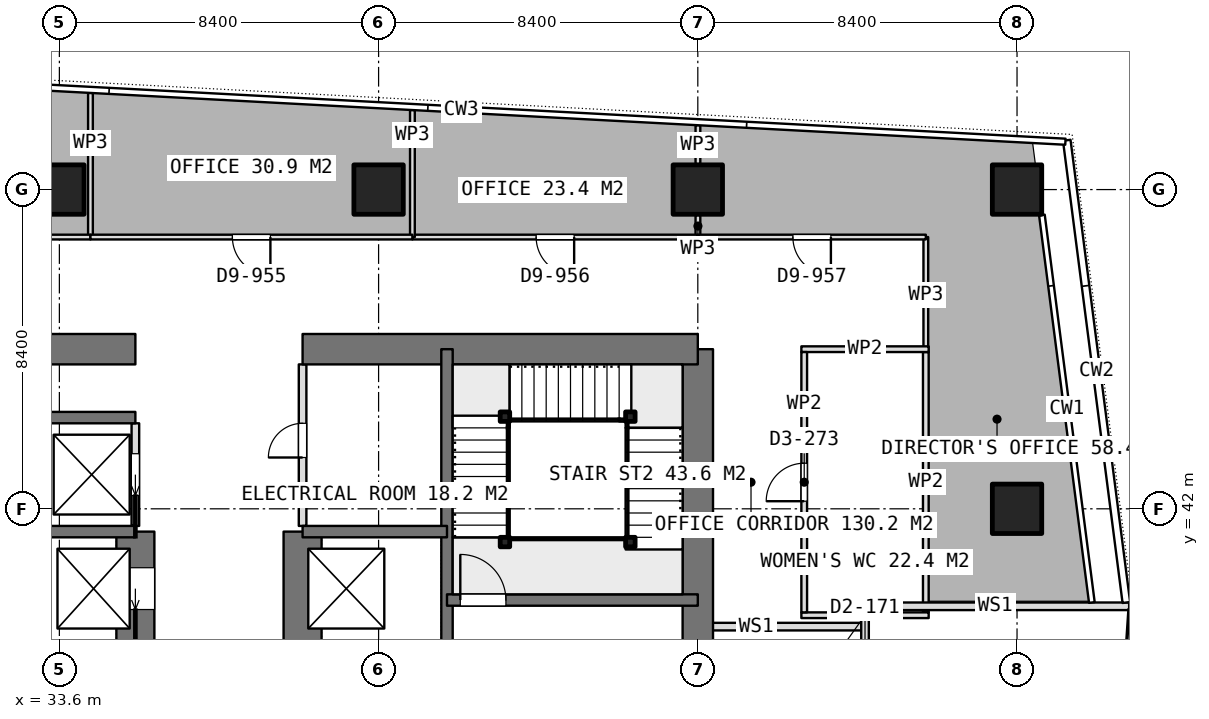
"""IFC4 building model, lengths in metres.
Left out: names, types, materials, properties, quantities, classifications, styles, units other than length and angle.
Written with IfcOpenShell. Run it as: python <this file> out.ifc"""

import sys

from ifc_helpers import new_model, si_unit, direction, frame, frame_2d, origin, origin_2d, place, context, subcontext, project, spatial, rectangle, extrude, element, fill, save


model = new_model("IFC4")
c1 = context("Model", 3, precision=1e-05, world=origin(), true_north=direction((0.0, 1.0)))
c2 = subcontext(c1, "Body", "Model", "MODEL_VIEW")
j1 = project(units=[si_unit("LENGTHUNIT", "METRE"), si_unit("PLANEANGLEUNIT", "RADIAN")], contexts=[c1])
p1 = place(None, origin())
s1 = spatial("IfcSite", under=j1, at=p1, CompositionType="ELEMENT")
p2 = place(p1, origin())
s2 = spatial("IfcBuilding", under=s1, at=p2, CompositionType="ELEMENT")
p3 = place(p2, frame((0.0, 0.0, 253.85)))
s3 = spatial("IfcBuildingStorey", under=s2, at=p3, CompositionType="ELEMENT", Elevation=253.85)
p4 = place(p3, frame((25.2, 46.2, 0.0), z_axis=(0.0, 0.0, 1.0), x_axis=(1.0, 0.0, 0.0)))
e1 = element("IfcWall", 1, at=p4, inside=s3, PredefinedType="SHEAR", context=c2, shape_type="SweptSolid", body=[
    extrude(rectangle(XDim=10.4, YDim=0.8, at=frame_2d((5.2, 0.0))), origin(), (0.0, 0.0, 1.0), 3.75),
])
p5 = place(p3, frame((40.0, 46.2, 0.0), z_axis=(0.0, 0.0, 1.0), x_axis=(1.0, 0.0, 0.0)))
e2 = element("IfcWall", 2, at=p5, inside=s3, PredefinedType="SHEAR", context=c2, shape_type="SweptSolid", body=[
    extrude(rectangle(XDim=10.4, YDim=0.8, at=frame_2d((5.2, 0.0))), origin(), (0.0, 0.0, 1.0), 3.75),
])
p6 = place(p3, frame((50.4, 21.0, 0.0), z_axis=(0.0, 0.0, 1.0), x_axis=(0.0, 1.0, 0.0)))
e3 = element("IfcWall", 3, at=p6, inside=s3, PredefinedType="SHEAR", context=c2, shape_type="SweptSolid", body=[
    extrude(rectangle(XDim=25.2, YDim=0.8, at=frame_2d((12.6, 0.0))), origin(), (0.0, 0.0, 1.0), 3.75),
])
p7 = place(p6, frame((16.2, 0.0, 0.0)))
e4 = element("IfcOpeningElement", 4, at=p7, cuts=e3, PredefinedType="OPENING", context=c2, shape_type="SweptSolid", body=[
    extrude(rectangle(XDim=1.2, YDim=2.1, at=frame_2d((0.6, 1.05))), frame((0.0, 0.41, 0.0), z_axis=(0.0, -1.0, 0.0), x_axis=(1.0, 0.0, 0.0)), (0.0, 0.0, 1.0), 0.82),
])
p8 = place(p6, frame((10.05, 0.0, 0.0)))
e5 = element("IfcOpeningElement", 5, at=p8, cuts=e3, PredefinedType="OPENING", context=c2, shape_type="SweptSolid", body=[
    extrude(rectangle(XDim=0.9, YDim=2.1, at=frame_2d((0.45, 1.05))), frame((0.0, 0.41, 0.0), z_axis=(0.0, -1.0, 0.0), x_axis=(1.0, 0.0, 0.0)), (0.0, 0.0, 1.0), 0.82),
])
p9 = place(p6, frame((7.45, 0.0, 0.0)))
e6 = element("IfcOpeningElement", 6, at=p9, cuts=e3, PredefinedType="OPENING", context=c2, shape_type="SweptSolid", body=[
    extrude(rectangle(XDim=0.9, YDim=2.1, at=frame_2d((0.45, 1.05))), frame((0.0, 0.41, 0.0), z_axis=(0.0, -1.0, 0.0), x_axis=(1.0, 0.0, 0.0)), (0.0, 0.0, 1.0), 0.82),
])
p10 = place(p6, frame((0.6, 0.0, 0.0)))
e7 = element("IfcOpeningElement", 7, at=p10, cuts=e3, PredefinedType="OPENING", context=c2, shape_type="SweptSolid", body=[
    extrude(rectangle(XDim=1.2, YDim=2.1, at=frame_2d((0.6, 1.05))), frame((0.0, 0.41, 0.0), z_axis=(0.0, -1.0, 0.0), x_axis=(1.0, 0.0, 0.0)), (0.0, 0.0, 1.0), 0.82),
])
p11 = place(p3, frame((43.8, 21.0, 0.0), z_axis=(0.0, 0.0, 1.0), x_axis=(0.0, 1.0, 0.0)))
e8 = element("IfcWall", 8, at=p11, inside=s3, PredefinedType="SHEAR", context=c2, shape_type="SweptSolid", body=[
    extrude(rectangle(XDim=25.2, YDim=0.3, at=frame_2d((12.6, 0.0))), origin(), (0.0, 0.0, 1.0), 3.75),
])
p12 = place(p3, frame((35.6, 23.4, 0.0), z_axis=(0.0, 0.0, 1.0), x_axis=(0.0, 1.0, 0.0)))
e9 = element("IfcWall", 9, at=p12, inside=s3, PredefinedType="SHEAR", context=c2, shape_type="SweptSolid", body=[
    extrude(rectangle(XDim=18.0, YDim=1.0, at=frame_2d((9.0, 0.0))), origin(), (0.0, 0.0, 1.0), 3.75),
])
p13 = place(p12, frame((0.95, 0.0, 0.0)))
e10 = element("IfcOpeningElement", 10, at=p13, cuts=e9, PredefinedType="OPENING", context=c2, shape_type="SweptSolid", body=[
    extrude(rectangle(XDim=1.1, YDim=2.1, at=frame_2d((0.55, 1.05))), frame((0.0, 0.51, 0.0), z_axis=(0.0, -1.0, 0.0), x_axis=(1.0, 0.0, 0.0)), (0.0, 0.0, 1.0), 1.02),
])
p14 = place(p12, frame((3.95, 0.0, 0.0)))
e11 = element("IfcOpeningElement", 11, at=p14, cuts=e9, PredefinedType="OPENING", context=c2, shape_type="SweptSolid", body=[
    extrude(rectangle(XDim=1.1, YDim=2.1, at=frame_2d((0.55, 1.05))), frame((0.0, 0.51, 0.0), z_axis=(0.0, -1.0, 0.0), x_axis=(1.0, 0.0, 0.0)), (0.0, 0.0, 1.0), 1.02),
])
p15 = place(p12, frame((6.95, 0.0, 0.0)))
e12 = element("IfcOpeningElement", 12, at=p15, cuts=e9, PredefinedType="OPENING", context=c2, shape_type="SweptSolid", body=[
    extrude(rectangle(XDim=1.1, YDim=2.1, at=frame_2d((0.55, 1.05))), frame((0.0, 0.51, 0.0), z_axis=(0.0, -1.0, 0.0), x_axis=(1.0, 0.0, 0.0)), (0.0, 0.0, 1.0), 1.02),
])
p16 = place(p12, frame((9.95, 0.0, 0.0)))
e13 = element("IfcOpeningElement", 13, at=p16, cuts=e9, PredefinedType="OPENING", context=c2, shape_type="SweptSolid", body=[
    extrude(rectangle(XDim=1.1, YDim=2.1, at=frame_2d((0.55, 1.05))), frame((0.0, 0.51, 0.0), z_axis=(0.0, -1.0, 0.0), x_axis=(1.0, 0.0, 0.0)), (0.0, 0.0, 1.0), 1.02),
])
p17 = place(p12, frame((12.95, 0.0, 0.0)))
e14 = element("IfcOpeningElement", 14, at=p17, cuts=e9, PredefinedType="OPENING", context=c2, shape_type="SweptSolid", body=[
    extrude(rectangle(XDim=1.1, YDim=2.1, at=frame_2d((0.55, 1.05))), frame((0.0, 0.51, 0.0), z_axis=(0.0, -1.0, 0.0), x_axis=(1.0, 0.0, 0.0)), (0.0, 0.0, 1.0), 1.02),
])
p18 = place(p12, frame((15.95, 0.0, 0.0)))
e15 = element("IfcOpeningElement", 15, at=p18, cuts=e9, PredefinedType="OPENING", context=c2, shape_type="SweptSolid", body=[
    extrude(rectangle(XDim=1.1, YDim=2.1, at=frame_2d((0.55, 1.05))), frame((0.0, 0.51, 0.0), z_axis=(0.0, -1.0, 0.0), x_axis=(1.0, 0.0, 0.0)), (0.0, 0.0, 1.0), 1.02),
])
p19 = place(p3, frame((40.0, 23.4, 0.0), z_axis=(0.0, 0.0, 1.0), x_axis=(0.0, 1.0, 0.0)))
e16 = element("IfcWall", 16, at=p19, inside=s3, PredefinedType="SHEAR", context=c2, shape_type="SweptSolid", body=[
    extrude(rectangle(XDim=18.0, YDim=1.0, at=frame_2d((9.0, 0.0))), origin(), (0.0, 0.0, 1.0), 3.75),
])
p20 = place(p19, frame((3.15, 0.0, 0.0)))
e17 = element("IfcOpeningElement", 17, at=p20, cuts=e16, PredefinedType="OPENING", context=c2, shape_type="SweptSolid", body=[
    extrude(rectangle(XDim=0.9, YDim=2.1, at=frame_2d((0.45, 1.05))), frame((0.0, 0.51, 0.0), z_axis=(0.0, -1.0, 0.0), x_axis=(1.0, 0.0, 0.0)), (0.0, 0.0, 1.0), 1.02),
])
p21 = place(p19, frame((9.15, 0.0, 0.0)))
e18 = element("IfcOpeningElement", 18, at=p21, cuts=e16, PredefinedType="OPENING", context=c2, shape_type="SweptSolid", body=[
    extrude(rectangle(XDim=0.9, YDim=2.1, at=frame_2d((0.45, 1.05))), frame((0.0, 0.51, 0.0), z_axis=(0.0, -1.0, 0.0), x_axis=(1.0, 0.0, 0.0)), (0.0, 0.0, 1.0), 1.02),
])
for number, where, z_axis, x_axis in (
    (19, (31.8, 41.4, 0.0), (0.0, 0.0, 1.0), (1.0, 0.0, 0.0)),
    (20, (31.8, 44.4, 0.0), (0.0, 0.0, 1.0), (1.0, 0.0, 0.0)),
    (21, (40.0, 41.4, 0.0), (0.0, 0.0, 1.0), (1.0, 0.0, 0.0)),
):
    element("IfcWall", number, at=place(p3, frame(where, z_axis=z_axis, x_axis=x_axis)), inside=s3, PredefinedType="SHEAR", context=c2, shape_type="SweptSolid", body=[
        extrude(rectangle(XDim=3.8, YDim=0.3, at=frame_2d((1.9, 0.0))), origin(), (0.0, 0.0, 1.0), 3.75),
    ])
p22 = place(p3, frame((43.8, 39.6, 0.0), z_axis=(0.0, 0.0, 1.0), x_axis=(1.0, 0.0, 0.0)))
e22 = element("IfcWall", 22, at=p22, inside=s3, PredefinedType="SHEAR", context=c2, shape_type="SweptSolid", body=[
    extrude(rectangle(XDim=6.6, YDim=0.3, at=frame_2d((3.3, 0.0))), origin(), (0.0, 0.0, 1.0), 3.75),
])
p23 = place(p22, frame((0.35, 0.0, 0.0)))
e23 = element("IfcOpeningElement", 23, at=p23, cuts=e22, PredefinedType="OPENING", context=c2, shape_type="SweptSolid", body=[
    extrude(rectangle(XDim=1.2, YDim=2.1, at=frame_2d((0.6, 1.05))), frame((0.0, 0.16, 0.0), z_axis=(0.0, -1.0, 0.0), x_axis=(1.0, 0.0, 0.0)), (0.0, 0.0, 1.0), 0.32),
])
for number, where, z_axis, x_axis in (
    (24, (33.6, 50.4, 0.0), (0.0, 0.0, 1.0), (1.0, 0.0, 0.0)),
    (25, (42.0, 50.4, 0.0), (0.0, 0.0, 1.0), (1.0, 0.0, 0.0)),
    (26, (50.4, 50.4, 0.0), (0.0, 0.0, 1.0), (1.0, 0.0, 0.0)),
    (27, (58.8, 42.0, 0.0), (0.0, 0.0, 1.0), (1.0, 0.0, 0.0)),
    (28, (58.8, 50.4, 0.0), (0.0, 0.0, 1.0), (1.0, 0.0, 0.0)),
):
    element("IfcColumn", number, at=place(p3, frame(where, z_axis=z_axis, x_axis=x_axis)), inside=s3, PredefinedType="COLUMN", context=c2, shape_type="SweptSolid", body=[
        extrude(rectangle(XDim=1.3, YDim=1.3, at=origin_2d()), origin(), (0.0, 0.0, 1.0), 3.75),
    ])
p24 = place(p3, frame((40.0, 41.55, 0.0), z_axis=(0.0, 0.0, 1.0), x_axis=(0.0, 1.0, 0.0)))
e29 = element("IfcWall", 29, at=p24, inside=s3, PredefinedType="PARTITIONING", context=c2, shape_type="SweptSolid", body=[
    extrude(rectangle(XDim=4.25, YDim=0.2, at=frame_2d((2.125, 0.0))), origin(), (0.0, 0.0, 1.0), 3.5),
])
p25 = place(p24, frame((1.8, 0.0, 0.0)))
e30 = element("IfcOpeningElement", 30, at=p25, cuts=e29, PredefinedType="OPENING", context=c2, shape_type="SweptSolid", body=[
    extrude(rectangle(XDim=0.9, YDim=2.1, at=frame_2d((0.45, 1.05))), frame((0.0, 0.11, 0.0), z_axis=(0.0, -1.0, 0.0), x_axis=(1.0, 0.0, 0.0)), (0.0, 0.0, 1.0), 0.22),
])
p26 = place(p3, frame((35.6, 41.55, 0.0), z_axis=(0.0, 0.0, 1.0), x_axis=(0.0, 1.0, 0.0)))
e31 = element("IfcWall", 31, at=p26, inside=s3, PredefinedType="PARTITIONING", context=c2, shape_type="SweptSolid", body=[
    extrude(rectangle(XDim=2.7, YDim=0.2, at=frame_2d((1.35, 0.0))), origin(), (0.0, 0.0, 1.0), 3.5),
])
p27 = place(p26, frame((0.8, 0.0, 0.0)))
e32 = element("IfcOpeningElement", 32, at=p27, cuts=e31, PredefinedType="OPENING", context=c2, shape_type="SweptSolid", body=[
    extrude(rectangle(XDim=1.1, YDim=2.1, at=frame_2d((0.55, 1.05))), frame((0.0, 0.11, 0.0), z_axis=(0.0, -1.0, 0.0), x_axis=(1.0, 0.0, 0.0)), (0.0, 0.0, 1.0), 0.22),
])
for number, where, z_axis, x_axis in (
    (33, (53.125, 39.2, 0.0), (0.0, 0.0, 1.0), (1.0, 0.0, 0.0)),
    (34, (53.125, 46.2, 0.0), (0.0, 0.0, 1.0), (1.0, 0.0, 0.0)),
):
    element("IfcWall", number, at=place(p3, frame(where, z_axis=z_axis, x_axis=x_axis)), inside=s3, PredefinedType="PARTITIONING", context=c2, shape_type="SweptSolid", body=[
        extrude(rectangle(XDim=3.35, YDim=0.15, at=frame_2d((1.675, 0.0))), origin(), (0.0, 0.0, 1.0), 3.5),
    ])
p28 = place(p3, frame((53.2, 39.275, 0.0), z_axis=(0.0, 0.0, 1.0), x_axis=(0.0, 1.0, 0.0)))
e35 = element("IfcWall", 35, at=p28, inside=s3, PredefinedType="PARTITIONING", context=c2, shape_type="SweptSolid", body=[
    extrude(rectangle(XDim=6.85, YDim=0.15, at=frame_2d((3.425, 0.0))), origin(), (0.0, 0.0, 1.0), 3.5),
])
p29 = place(p28, frame((2.925, 0.0, 0.0)))
e36 = element("IfcOpeningElement", 36, at=p29, cuts=e35, PredefinedType="OPENING", context=c2, shape_type="SweptSolid", body=[
    extrude(rectangle(XDim=1.0, YDim=2.1, at=frame_2d((0.5, 1.05))), frame((0.0, 0.085, 0.0), z_axis=(0.0, -1.0, 0.0), x_axis=(1.0, 0.0, 0.0)), (0.0, 0.0, 1.0), 0.17),
])
p30 = place(p3, frame((56.4, 39.275, 0.0), z_axis=(0.0, 0.0, 1.0), x_axis=(0.0, 1.0, 0.0)))
e37 = element("IfcWall", 37, at=p30, inside=s3, PredefinedType="PARTITIONING", context=c2, shape_type="SweptSolid", body=[
    extrude(rectangle(XDim=6.85, YDim=0.15, at=frame_2d((3.425, 0.0))), origin(), (0.0, 0.0, 1.0), 3.5),
])
p31 = place(p3, frame((50.403, 49.15, 0.0), z_axis=(0.0, 0.0, 1.0), x_axis=(0.0, 1.0, 0.0)))
e38 = element("IfcWall", 38, at=p31, inside=s3, PredefinedType="PARTITIONING", context=c2, shape_type="SweptSolid", body=[
    extrude(rectangle(XDim=0.58, YDim=0.125, at=frame_2d((0.29, 0.0))), origin(), (0.0, 0.0, 1.0), 3.5),
])
p32 = place(p3, frame((50.403, 51.07, 0.0), z_axis=(0.0, 0.0, 1.0), x_axis=(0.0, 1.0, 0.0)))
e39 = element("IfcWall", 39, at=p32, inside=s3, PredefinedType="PARTITIONING", context=c2, shape_type="SweptSolid", body=[
    extrude(rectangle(XDim=1.024, YDim=0.125, at=frame_2d((0.512, 0.0))), origin(), (0.0, 0.0, 1.0), 3.5),
])
p33 = place(p3, frame((56.4, 46.125, 0.0), z_axis=(0.0, 0.0, 1.0), x_axis=(0.0, 1.0, 0.0)))
e40 = element("IfcWall", 40, at=p33, inside=s3, PredefinedType="PARTITIONING", context=c2, shape_type="SweptSolid", body=[
    extrude(rectangle(XDim=3.025, YDim=0.125, at=frame_2d((1.512, 0.0))), origin(), (0.0, 0.0, 1.0), 3.5),
])
p34 = place(p3, frame((56.4, 49.15, 0.0), z_axis=(0.0, 0.0, 1.0), x_axis=(-1.0, 0.0, 0.0)))
e41 = element("IfcWall", 41, at=p34, inside=s3, PredefinedType="PARTITIONING", context=c2, shape_type="SweptSolid", body=[
    extrude(rectangle(XDim=5.997, YDim=0.125, at=frame_2d((2.999, 0.0))), origin(), (0.0, 0.0, 1.0), 3.5),
])
p35 = place(p34, frame((2.498, 0.0, 0.0)))
e42 = element("IfcOpeningElement", 42, at=p35, cuts=e41, PredefinedType="OPENING", context=c2, shape_type="SweptSolid", body=[
    extrude(rectangle(XDim=1.0, YDim=2.1, at=frame_2d((0.5, 1.05))), frame((0.0, 0.073, 0.0), z_axis=(0.0, -1.0, 0.0), x_axis=(1.0, 0.0, 0.0)), (0.0, 0.0, 1.0), 0.145),
])
p36 = place(p3, frame((50.402, 49.15, 0.0), z_axis=(0.0, 0.0, 1.0), x_axis=(-1.0, 0.0, 0.0)))
e43 = element("IfcWall", 43, at=p36, inside=s3, PredefinedType="PARTITIONING", context=c2, shape_type="SweptSolid", body=[
    extrude(rectangle(XDim=7.512, YDim=0.125, at=frame_2d((3.756, 0.0))), origin(), (0.0, 0.0, 1.0), 3.5),
])
p37 = place(p36, frame((3.256, 0.0, 0.0)))
e44 = element("IfcOpeningElement", 44, at=p37, cuts=e43, PredefinedType="OPENING", context=c2, shape_type="SweptSolid", body=[
    extrude(rectangle(XDim=1.0, YDim=2.1, at=frame_2d((0.5, 1.05))), frame((0.0, 0.073, 0.0), z_axis=(0.0, -1.0, 0.0), x_axis=(1.0, 0.0, 0.0)), (0.0, 0.0, 1.0), 0.145),
])
p38 = place(p3, frame((42.89, 49.15, 0.0), z_axis=(0.0, 0.0, 1.0), x_axis=(0.0, 1.0, 0.0)))
e45 = element("IfcWall", 45, at=p38, inside=s3, PredefinedType="PARTITIONING", context=c2, shape_type="SweptSolid", body=[
    extrude(rectangle(XDim=3.343, YDim=0.125, at=frame_2d((1.671, 0.0))), origin(), (0.0, 0.0, 1.0), 3.5),
])
p39 = place(p3, frame((42.889, 49.15, 0.0), z_axis=(0.0, 0.0, 1.0), x_axis=(-1.0, 0.0, 0.0)))
e46 = element("IfcWall", 46, at=p39, inside=s3, PredefinedType="PARTITIONING", context=c2, shape_type="SweptSolid", body=[
    extrude(rectangle(XDim=8.471, YDim=0.125, at=frame_2d((4.235, 0.0))), origin(), (0.0, 0.0, 1.0), 3.5),
])
p40 = place(p39, frame((3.736, 0.0, 0.0)))
e47 = element("IfcOpeningElement", 47, at=p40, cuts=e46, PredefinedType="OPENING", context=c2, shape_type="SweptSolid", body=[
    extrude(rectangle(XDim=1.0, YDim=2.1, at=frame_2d((0.5, 1.05))), frame((0.0, 0.073, 0.0), z_axis=(0.0, -1.0, 0.0), x_axis=(1.0, 0.0, 0.0)), (0.0, 0.0, 1.0), 0.145),
])
p41 = place(p3, frame((34.418, 49.15, 0.0), z_axis=(0.0, 0.0, 1.0), x_axis=(0.0, 1.0, 0.0)))
e48 = element("IfcWall", 48, at=p41, inside=s3, PredefinedType="PARTITIONING", context=c2, shape_type="SweptSolid", body=[
    extrude(rectangle(XDim=3.793, YDim=0.125, at=frame_2d((1.896, 0.0))), origin(), (0.0, 0.0, 1.0), 3.5),
])
p42 = place(p3, frame((34.417, 49.15, 0.0), z_axis=(0.0, 0.0, 1.0), x_axis=(-1.0, 0.0, 0.0)))
e49 = element("IfcWall", 49, at=p42, inside=s3, PredefinedType="PARTITIONING", context=c2, shape_type="SweptSolid", body=[
    extrude(rectangle(XDim=9.211, YDim=0.125, at=frame_2d((4.605, 0.0))), origin(), (0.0, 0.0, 1.0), 3.5),
])
p43 = place(p42, frame((4.105, 0.0, 0.0)))
e50 = element("IfcOpeningElement", 50, at=p43, cuts=e49, PredefinedType="OPENING", context=c2, shape_type="SweptSolid", body=[
    extrude(rectangle(XDim=1.0, YDim=2.1, at=frame_2d((0.5, 1.05))), frame((0.0, 0.073, 0.0), z_axis=(0.0, -1.0, 0.0), x_axis=(1.0, 0.0, 0.0)), (0.0, 0.0, 1.0), 0.145),
])
for number, where, z_axis, x_axis in (
    (51, (45.325, 41.125, 0.0), (0.0, 0.0, 1.0), (1.0, 0.0, 0.0)),
    (52, (45.325, 44.425, 0.0), (0.0, 0.0, 1.0), (1.0, 0.0, 0.0)),
    (53, (48.625, 44.425, 0.0), (0.0, 0.0, 1.0), (1.0, 0.0, 0.0)),
    (54, (48.625, 41.125, 0.0), (0.0, 0.0, 1.0), (1.0, 0.0, 0.0)),
):
    element("IfcColumn", number, at=place(p3, frame(where, z_axis=z_axis, x_axis=x_axis)), inside=s3, PredefinedType="COLUMN", context=c2, shape_type="SweptSolid", body=[
        extrude(rectangle(XDim=0.25, YDim=0.25, at=origin_2d()), origin(), (0.0, 0.0, 1.0), 3.75),
    ])
p44 = place(p3, frame((54.8, 15.602, 0.0), z_axis=(0.0, 0.0, 1.0), x_axis=(0.0, 1.0, 0.0)))
e55 = element("IfcWall", 55, at=p44, inside=s3, PredefinedType="PARTITIONING", context=c2, shape_type="SweptSolid", body=[
    extrude(rectangle(XDim=23.733, YDim=0.2, at=frame_2d((11.866, 0.0))), origin(), (0.0, 0.0, 1.0), 3.5),
])
p45 = place(p44, frame((21.598, 0.0, 0.0)))
e56 = element("IfcOpeningElement", 56, at=p45, cuts=e55, PredefinedType="OPENING", context=c2, shape_type="SweptSolid", body=[
    extrude(rectangle(XDim=1.2, YDim=2.1, at=frame_2d((0.6, 1.05))), frame((0.0, 0.11, 0.0), z_axis=(0.0, -1.0, 0.0), x_axis=(1.0, 0.0, 0.0)), (0.0, 0.0, 1.0), 0.22),
])
p46 = place(p3, frame((54.7, 39.435, 0.0), z_axis=(0.0, 0.0, 1.0), x_axis=(1.0, 0.0, 0.0)))
e57 = element("IfcWall", 57, at=p46, inside=s3, PredefinedType="PARTITIONING", context=c2, shape_type="SweptSolid", body=[
    extrude(rectangle(XDim=7.05, YDim=0.2, at=frame_2d((3.525, 0.0))), origin(), (0.0, 0.0, 1.0), 3.5),
])
p47 = place(p3, frame((50.4, 38.9, 0.0), z_axis=(0.0, 0.0, 1.0), x_axis=(1.0, 0.0, 0.0)))
e58 = element("IfcWall", 58, at=p47, inside=s3, PredefinedType="PARTITIONING", context=c2, shape_type="SweptSolid", body=[
    extrude(rectangle(XDim=4.4, YDim=0.2, at=frame_2d((2.2, 0.0))), origin(), (0.0, 0.0, 1.0), 3.5),
])
p48 = place(p25, origin())
e59 = element("IfcDoor", 59, at=p48, inside=s3, OperationType="SINGLE_SWING_LEFT", PredefinedType="DOOR", context=c2, shape_type="SweptSolid", body=[
    extrude(rectangle(XDim=0.9, YDim=2.1, at=frame_2d((0.45, 1.05))), frame((0.0, 0.025, 0.0), z_axis=(0.0, -1.0, 0.0), x_axis=(1.0, 0.0, 0.0)), (0.0, 0.0, 1.0), 0.05),
])
fill(e30, e59)
p49 = place(p18, origin())
e60 = element("IfcDoor", 60, at=p49, inside=s3, OperationType="SLIDING_TO_LEFT", PredefinedType="USERDEFINED", context=c2, shape_type="SweptSolid", body=[
    extrude(rectangle(XDim=1.1, YDim=2.1, at=frame_2d((0.55, 1.05))), frame((0.0, 0.025, 0.0), z_axis=(0.0, -1.0, 0.0), x_axis=(1.0, 0.0, 0.0)), (0.0, 0.0, 1.0), 0.05),
])
fill(e15, e60)
p50 = place(p27, origin())
e61 = element("IfcDoor", 61, at=p50, inside=s3, OperationType="SLIDING_TO_LEFT", PredefinedType="USERDEFINED", context=c2, shape_type="SweptSolid", body=[
    extrude(rectangle(XDim=1.1, YDim=2.1, at=frame_2d((0.55, 1.05))), frame((0.0, 0.025, 0.0), z_axis=(0.0, -1.0, 0.0), x_axis=(1.0, 0.0, 0.0)), (0.0, 0.0, 1.0), 0.05),
])
fill(e32, e61)
p51 = place(p29, origin())
e62 = element("IfcDoor", 62, at=p51, inside=s3, OperationType="SINGLE_SWING_LEFT", PredefinedType="DOOR", context=c2, shape_type="SweptSolid", body=[
    extrude(rectangle(XDim=1.0, YDim=2.1, at=frame_2d((0.5, 1.05))), frame((0.0, 0.025, 0.0), z_axis=(0.0, -1.0, 0.0), x_axis=(1.0, 0.0, 0.0)), (0.0, 0.0, 1.0), 0.05),
])
fill(e36, e62)
p52 = place(p35, origin())
e63 = element("IfcDoor", 63, at=p52, inside=s3, OperationType="SINGLE_SWING_LEFT", PredefinedType="DOOR", context=c2, shape_type="SweptSolid", body=[
    extrude(rectangle(XDim=1.0, YDim=2.1, at=frame_2d((0.5, 1.05))), frame((0.0, 0.025, 0.0), z_axis=(0.0, -1.0, 0.0), x_axis=(1.0, 0.0, 0.0)), (0.0, 0.0, 1.0), 0.05),
])
fill(e42, e63)
p53 = place(p37, origin())
e64 = element("IfcDoor", 64, at=p53, inside=s3, OperationType="SINGLE_SWING_LEFT", PredefinedType="DOOR", context=c2, shape_type="SweptSolid", body=[
    extrude(rectangle(XDim=1.0, YDim=2.1, at=frame_2d((0.5, 1.05))), frame((0.0, 0.025, 0.0), z_axis=(0.0, -1.0, 0.0), x_axis=(1.0, 0.0, 0.0)), (0.0, 0.0, 1.0), 0.05),
])
fill(e44, e64)
p54 = place(p40, origin())
e65 = element("IfcDoor", 65, at=p54, inside=s3, OperationType="SINGLE_SWING_LEFT", PredefinedType="DOOR", context=c2, shape_type="SweptSolid", body=[
    extrude(rectangle(XDim=1.0, YDim=2.1, at=frame_2d((0.5, 1.05))), frame((0.0, 0.025, 0.0), z_axis=(0.0, -1.0, 0.0), x_axis=(1.0, 0.0, 0.0)), (0.0, 0.0, 1.0), 0.05),
])
fill(e47, e65)
p55 = place(p23, origin())
e66 = element("IfcDoor", 66, at=p55, inside=s3, OperationType="SINGLE_SWING_RIGHT", PredefinedType="DOOR", context=c2, shape_type="SweptSolid", body=[
    extrude(rectangle(XDim=1.2, YDim=2.1, at=frame_2d((0.6, 1.05))), frame((0.0, 0.025, 0.0), z_axis=(0.0, -1.0, 0.0), x_axis=(1.0, 0.0, 0.0)), (0.0, 0.0, 1.0), 0.05),
])
fill(e23, e66)
save(model, sys.argv[1])
